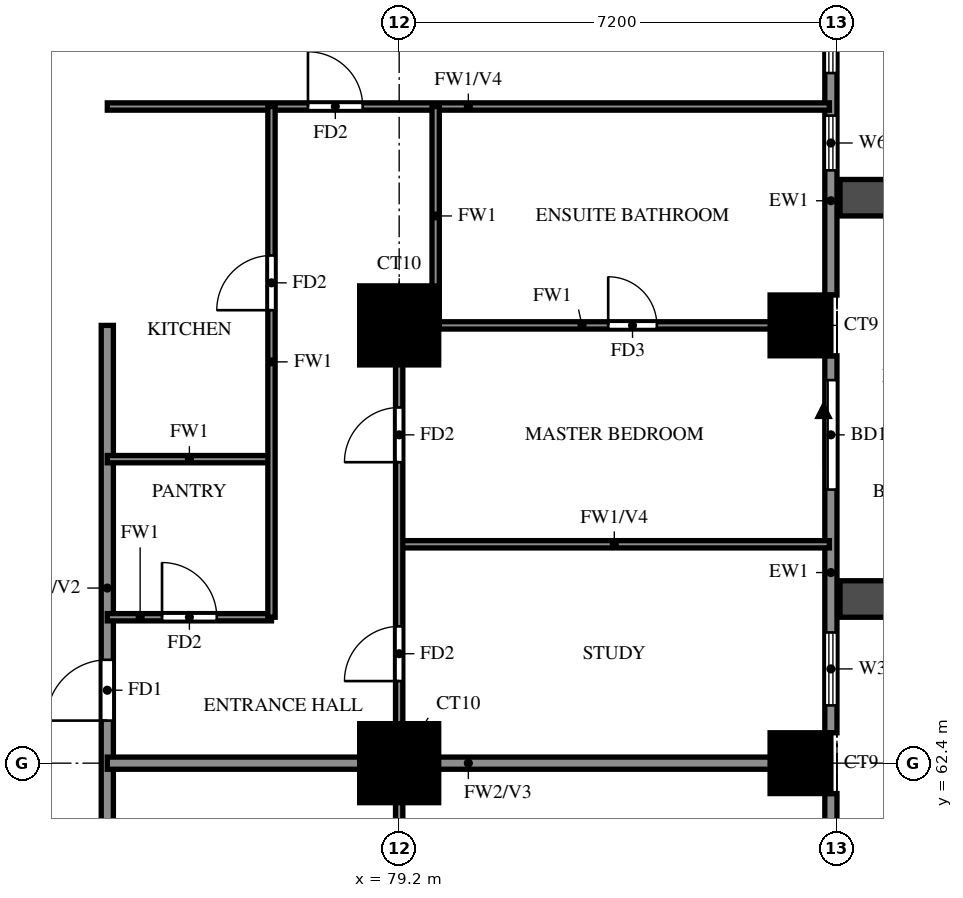
"""IFC4 building model, lengths in metres.
Left out: names, types, materials, properties, quantities, classifications, styles, units other than length and angle.
Written with IfcOpenShell. Run it as: python <this file> out.ifc"""

import sys

from ifc_helpers import new_model, si_unit, direction, frame, frame_2d, origin, origin_2d, place, context, subcontext, project, spatial, rectangle, extrude, source, transform, mapped, element, fill, save


model = new_model("IFC4")
c1 = context("Model", 3, precision=1e-05, world=origin(), true_north=direction((0.0, 1.0)))
c2 = subcontext(c1, "Body", "Model", "MODEL_VIEW")
j1 = project(units=[si_unit("LENGTHUNIT", "METRE"), si_unit("PLANEANGLEUNIT", "RADIAN")], contexts=[c1])
p1 = place(None, origin())
s1 = spatial("IfcSite", under=j1, at=p1, CompositionType="ELEMENT")
p2 = place(p1, origin())
s2 = spatial("IfcBuilding", under=s1, at=p2, CompositionType="ELEMENT")
p3 = place(p2, frame((0.0, 0.0, 65.5)))
s3 = spatial("IfcBuildingStorey", under=s2, at=p3, CompositionType="ELEMENT", Elevation=65.5)
m1 = source(origin(), c2, "Body", "SweptSolid", [
    extrude(rectangle(XDim=1.3, YDim=1.3, at=origin_2d()), origin(), (0.0, 0.0, 1.0), 3.18),
])
p4 = place(p3, frame((79.2, 62.4, 0.0), z_axis=(0.0, 0.0, 1.0), x_axis=(1.0, 0.0, 0.0)))
e1 = element("IfcColumn", 1, at=p4, inside=s3, PredefinedType="COLUMN", context=c2, shape_type="MappedRepresentation", body=[
    mapped(m1, transform((0.0, 0.0, 0.0))),
])
m2 = source(origin(), c2, "Body", "SweptSolid", [
    extrude(rectangle(XDim=1.0, YDim=1.0, at=origin_2d()), origin(), (0.0, 0.0, 1.0), 3.18),
])
p5 = place(p3, frame((85.8, 62.4, 0.0), z_axis=(0.0, 0.0, 1.0), x_axis=(1.0, 0.0, 0.0)))
e2 = element("IfcColumn", 2, at=p5, inside=s3, PredefinedType="COLUMN", context=c2, shape_type="MappedRepresentation", body=[
    mapped(m2, transform((0.0, 0.0, 0.0))),
])
p6 = place(p3, frame((79.2, 69.6, 0.0), z_axis=(0.0, 0.0, 1.0), x_axis=(1.0, 0.0, 0.0)))
e3 = element("IfcColumn", 3, at=p6, inside=s3, PredefinedType="COLUMN", context=c2, shape_type="MappedRepresentation", body=[
    mapped(m1, transform((0.0, 0.0, 0.0))),
])
p7 = place(p3, frame((85.8, 69.6, 0.0), z_axis=(0.0, 0.0, 1.0), x_axis=(1.0, 0.0, 0.0)))
e4 = element("IfcColumn", 4, at=p7, inside=s3, PredefinedType="COLUMN", context=c2, shape_type="MappedRepresentation", body=[
    mapped(m2, transform((0.0, 0.0, 0.0))),
])
p8 = place(p3, frame((86.3, 55.7, 0.0), z_axis=(0.0, 0.0, 1.0), x_axis=(0.0, 1.0, 0.0)))
e5 = element("IfcWall", 5, at=p8, inside=s3, PredefinedType="SOLIDWALL", context=c2, shape_type="SweptSolid", body=[
    extrude(rectangle(XDim=6.2, YDim=0.2, at=frame_2d((3.1, 0.0))), origin(), (0.0, 0.0, 1.0), 3.18),
])
p9 = place(p8, frame((0.3, 0.0, 0.6)))
e6 = element("IfcOpeningElement", 6, at=p9, cuts=e5, PredefinedType="OPENING", context=c2, shape_type="SweptSolid", body=[
    extrude(rectangle(XDim=0.9, YDim=2.4, at=frame_2d((0.45, 1.2))), frame((0.0, 0.11, 0.0), z_axis=(0.0, -1.0, 0.0), x_axis=(1.0, 0.0, 0.0)), (0.0, 0.0, 1.0), 0.22),
])
p10 = place(p8, frame((2.75, 0.0, 0.6)))
e7 = element("IfcOpeningElement", 7, at=p10, cuts=e5, PredefinedType="OPENING", context=c2, shape_type="SweptSolid", body=[
    extrude(rectangle(XDim=2.4, YDim=2.4, at=frame_2d((1.2, 1.2))), frame((0.0, 0.11, 0.0), z_axis=(0.0, -1.0, 0.0), x_axis=(1.0, 0.0, 0.0)), (0.0, 0.0, 1.0), 0.22),
])
p11 = place(p3, frame((86.3, 62.9, 0.0), z_axis=(0.0, 0.0, 1.0), x_axis=(0.0, 1.0, 0.0)))
e8 = element("IfcWall", 8, at=p11, inside=s3, PredefinedType="SOLIDWALL", context=c2, shape_type="SweptSolid", body=[
    extrude(rectangle(XDim=6.2, YDim=0.2, at=frame_2d((3.1, 0.0))), origin(), (0.0, 0.0, 1.0), 3.18),
])
p12 = place(p11, frame((4.0, 0.0, 0.0)))
e9 = element("IfcOpeningElement", 9, at=p12, cuts=e8, PredefinedType="OPENING", context=c2, shape_type="SweptSolid", body=[
    extrude(rectangle(XDim=1.8, YDim=2.4, at=frame_2d((0.9, 1.2))), frame((0.0, 0.11, 0.0), z_axis=(0.0, -1.0, 0.0), x_axis=(1.0, 0.0, 0.0)), (0.0, 0.0, 1.0), 0.22),
])
p13 = place(p11, frame((0.45, 0.0, 0.6)))
e10 = element("IfcOpeningElement", 10, at=p13, cuts=e8, PredefinedType="OPENING", context=c2, shape_type="SweptSolid", body=[
    extrude(rectangle(XDim=1.2, YDim=2.4, at=frame_2d((0.6, 1.2))), frame((0.0, 0.11, 0.0), z_axis=(0.0, -1.0, 0.0), x_axis=(1.0, 0.0, 0.0)), (0.0, 0.0, 1.0), 0.22),
])
p14 = place(p3, frame((86.3, 70.1, 0.0), z_axis=(0.0, 0.0, 1.0), x_axis=(0.0, 1.0, 0.0)))
e11 = element("IfcWall", 11, at=p14, inside=s3, PredefinedType="SOLIDWALL", context=c2, shape_type="SweptSolid", body=[
    extrude(rectangle(XDim=6.2, YDim=0.2, at=frame_2d((3.1, 0.0))), origin(), (0.0, 0.0, 1.0), 3.18),
])
p15 = place(p14, frame((2.05, 0.0, 1.5)))
e12 = element("IfcOpeningElement", 12, at=p15, cuts=e11, PredefinedType="OPENING", context=c2, shape_type="SweptSolid", body=[
    extrude(rectangle(XDim=0.9, YDim=0.9, at=frame_2d((0.45, 0.45))), frame((0.0, 0.11, 0.0), z_axis=(0.0, -1.0, 0.0), x_axis=(1.0, 0.0, 0.0)), (0.0, 0.0, 1.0), 0.22),
])
p16 = place(p14, frame((3.65, 0.0, 0.6)))
e13 = element("IfcOpeningElement", 13, at=p16, cuts=e11, PredefinedType="OPENING", context=c2, shape_type="SweptSolid", body=[
    extrude(rectangle(XDim=1.8, YDim=2.4, at=frame_2d((0.9, 1.2))), frame((0.0, 0.11, 0.0), z_axis=(0.0, -1.0, 0.0), x_axis=(1.0, 0.0, 0.0)), (0.0, 0.0, 1.0), 0.22),
])
for number, where, z_axis, x_axis in (
    (14, (86.45, 65.1, 0.0), (0.0, 0.0, 1.0), (1.0, 0.0, 0.0)),
    (15, (86.45, 71.7, 0.0), (0.0, 0.0, 1.0), (1.0, 0.0, 0.0)),
):
    element("IfcWall", number, at=place(p3, frame(where, z_axis=z_axis, x_axis=x_axis)), inside=s3, PredefinedType="SOLIDWALL", context=c2, shape_type="SweptSolid", body=[
        extrude(rectangle(XDim=2.65, YDim=0.6, at=frame_2d((1.325, 0.0))), origin(), (0.0, 0.0, 1.0), 2.85),
    ])
p17 = place(p3, frame((74.4, 60.0, 0.0), z_axis=(0.0, 0.0, 1.0), x_axis=(0.0, 1.0, 0.0)))
e16 = element("IfcWall", 16, at=p17, inside=s3, PredefinedType="SOLIDWALL", context=c2, shape_type="SweptSolid", body=[
    extrude(rectangle(XDim=9.6, YDim=0.2, at=frame_2d((4.8, 0.0))), origin(), (0.0, 0.0, 1.0), 3.18),
])
p18 = place(p17, frame((3.1, 0.0, 0.0)))
e17 = element("IfcOpeningElement", 17, at=p18, cuts=e16, PredefinedType="OPENING", context=c2, shape_type="SweptSolid", body=[
    extrude(rectangle(XDim=1.0, YDim=2.1, at=frame_2d((0.5, 1.05))), frame((0.0, 0.11, 0.0), z_axis=(0.0, -1.0, 0.0), x_axis=(1.0, 0.0, 0.0)), (0.0, 0.0, 1.0), 0.22),
])
p19 = place(p3, frame((74.4, 62.4, 0.0), z_axis=(0.0, 0.0, 1.0), x_axis=(1.0, 0.0, 0.0)))
e18 = element("IfcWall", 18, at=p19, inside=s3, PredefinedType="SOLIDWALL", context=c2, shape_type="SweptSolid", body=[
    extrude(rectangle(XDim=11.875, YDim=0.2, at=frame_2d((5.938, 0.0))), origin(), (0.0, 0.0, 1.0), 3.18),
])
p20 = place(p3, frame((74.4, 64.8, 0.0), z_axis=(0.0, 0.0, 1.0), x_axis=(1.0, 0.0, 0.0)))
e19 = element("IfcWall", 19, at=p20, inside=s3, PredefinedType="PARTITIONING", context=c2, shape_type="SweptSolid", body=[
    extrude(rectangle(XDim=2.7, YDim=0.12, at=frame_2d((1.35, 0.0))), origin(), (0.0, 0.0, 1.0), 3.18),
])
p21 = place(p20, frame((0.9, 0.0, 0.0)))
e20 = element("IfcOpeningElement", 20, at=p21, cuts=e19, PredefinedType="OPENING", context=c2, shape_type="SweptSolid", body=[
    extrude(rectangle(XDim=0.9, YDim=2.1, at=frame_2d((0.45, 1.05))), frame((0.0, 0.07, 0.0), z_axis=(0.0, -1.0, 0.0), x_axis=(1.0, 0.0, 0.0)), (0.0, 0.0, 1.0), 0.14),
])
p22 = place(p3, frame((79.2, 66.0, 0.0), z_axis=(0.0, 0.0, 1.0), x_axis=(1.0, 0.0, 0.0)))
e21 = element("IfcWall", 21, at=p22, inside=s3, PredefinedType="PARTITIONING", context=c2, shape_type="SweptSolid", body=[
    extrude(rectangle(XDim=7.075, YDim=0.12, at=frame_2d((3.538, 0.0))), origin(), (0.0, 0.0, 1.0), 2.28),
])
p23 = place(p3, frame((74.4, 67.4, 0.0), z_axis=(0.0, 0.0, 1.0), x_axis=(1.0, 0.0, 0.0)))
e22 = element("IfcWall", 22, at=p23, inside=s3, PredefinedType="PARTITIONING", context=c2, shape_type="SweptSolid", body=[
    extrude(rectangle(XDim=2.7, YDim=0.12, at=frame_2d((1.35, 0.0))), origin(), (0.0, 0.0, 1.0), 3.18),
])
p24 = place(p3, frame((79.2, 69.6, 0.0), z_axis=(0.0, 0.0, 1.0), x_axis=(1.0, 0.0, 0.0)))
e23 = element("IfcWall", 23, at=p24, inside=s3, PredefinedType="PARTITIONING", context=c2, shape_type="SweptSolid", body=[
    extrude(rectangle(XDim=7.075, YDim=0.12, at=frame_2d((3.538, 0.0))), origin(), (0.0, 0.0, 1.0), 3.18),
])
p25 = place(p24, frame((3.438, 0.0, 0.0)))
e24 = element("IfcOpeningElement", 24, at=p25, cuts=e23, PredefinedType="OPENING", context=c2, shape_type="SweptSolid", body=[
    extrude(rectangle(XDim=0.8, YDim=2.1, at=frame_2d((0.4, 1.05))), frame((0.0, 0.07, 0.0), z_axis=(0.0, -1.0, 0.0), x_axis=(1.0, 0.0, 0.0)), (0.0, 0.0, 1.0), 0.14),
])
p26 = place(p3, frame((74.4, 73.2, 0.0), z_axis=(0.0, 0.0, 1.0), x_axis=(1.0, 0.0, 0.0)))
e25 = element("IfcWall", 25, at=p26, inside=s3, PredefinedType="PARTITIONING", context=c2, shape_type="SweptSolid", body=[
    extrude(rectangle(XDim=11.875, YDim=0.12, at=frame_2d((5.938, 0.0))), origin(), (0.0, 0.0, 1.0), 2.28),
])
p27 = place(p26, frame((3.3, 0.0, 0.0)))
e26 = element("IfcOpeningElement", 26, at=p27, cuts=e25, PredefinedType="OPENING", context=c2, shape_type="SweptSolid", body=[
    extrude(rectangle(XDim=0.9, YDim=2.1, at=frame_2d((0.45, 1.05))), frame((0.0, 0.07, 0.0), z_axis=(0.0, -1.0, 0.0), x_axis=(1.0, 0.0, 0.0)), (0.0, 0.0, 1.0), 0.14),
])
p28 = place(p3, frame((77.1, 64.8, 0.0), z_axis=(0.0, 0.0, 1.0), x_axis=(0.0, 1.0, 0.0)))
e27 = element("IfcWall", 27, at=p28, inside=s3, PredefinedType="PARTITIONING", context=c2, shape_type="SweptSolid", body=[
    extrude(rectangle(XDim=8.4, YDim=0.12, at=frame_2d((4.2, 0.0))), origin(), (0.0, 0.0, 1.0), 3.18),
])
p29 = place(p28, frame((5.05, 0.0, 0.0)))
e28 = element("IfcOpeningElement", 28, at=p29, cuts=e27, PredefinedType="OPENING", context=c2, shape_type="SweptSolid", body=[
    extrude(rectangle(XDim=0.9, YDim=2.1, at=frame_2d((0.45, 1.05))), frame((0.0, 0.07, 0.0), z_axis=(0.0, -1.0, 0.0), x_axis=(1.0, 0.0, 0.0)), (0.0, 0.0, 1.0), 0.14),
])
p30 = place(p3, frame((79.2, 48.125, 0.0), z_axis=(0.0, 0.0, 1.0), x_axis=(0.0, 1.0, 0.0)))
e29 = element("IfcWall", 29, at=p30, inside=s3, PredefinedType="PARTITIONING", context=c2, shape_type="SweptSolid", body=[
    extrude(rectangle(XDim=21.475, YDim=0.12, at=frame_2d((10.738, 0.0))), origin(), (0.0, 0.0, 1.0), 3.18),
])
p31 = place(p30, frame((1.288, 0.0, 0.0)))
e30 = element("IfcOpeningElement", 30, at=p31, cuts=e29, PredefinedType="OPENING", context=c2, shape_type="SweptSolid", body=[
    extrude(rectangle(XDim=0.9, YDim=2.1, at=frame_2d((0.45, 1.05))), frame((0.0, 0.07, 0.0), z_axis=(0.0, -1.0, 0.0), x_axis=(1.0, 0.0, 0.0)), (0.0, 0.0, 1.0), 0.14),
])
p32 = place(p30, frame((4.825, 0.0, 0.0)))
e31 = element("IfcOpeningElement", 31, at=p32, cuts=e29, PredefinedType="OPENING", context=c2, shape_type="SweptSolid", body=[
    extrude(rectangle(XDim=0.9, YDim=2.1, at=frame_2d((0.45, 1.05))), frame((0.0, 0.07, 0.0), z_axis=(0.0, -1.0, 0.0), x_axis=(1.0, 0.0, 0.0)), (0.0, 0.0, 1.0), 0.14),
])
p33 = place(p30, frame((9.925, 0.0, 0.0)))
e32 = element("IfcOpeningElement", 32, at=p33, cuts=e29, PredefinedType="OPENING", context=c2, shape_type="SweptSolid", body=[
    extrude(rectangle(XDim=1.5, YDim=2.1, at=frame_2d((0.75, 1.05))), frame((0.0, 0.07, 0.0), z_axis=(0.0, -1.0, 0.0), x_axis=(1.0, 0.0, 0.0)), (0.0, 0.0, 1.0), 0.14),
])
p34 = place(p30, frame((15.625, 0.0, 0.0)))
e33 = element("IfcOpeningElement", 33, at=p34, cuts=e29, PredefinedType="OPENING", context=c2, shape_type="SweptSolid", body=[
    extrude(rectangle(XDim=0.9, YDim=2.1, at=frame_2d((0.45, 1.05))), frame((0.0, 0.07, 0.0), z_axis=(0.0, -1.0, 0.0), x_axis=(1.0, 0.0, 0.0)), (0.0, 0.0, 1.0), 0.14),
])
p35 = place(p30, frame((19.225, 0.0, 0.0)))
e34 = element("IfcOpeningElement", 34, at=p35, cuts=e29, PredefinedType="OPENING", context=c2, shape_type="SweptSolid", body=[
    extrude(rectangle(XDim=0.9, YDim=2.1, at=frame_2d((0.45, 1.05))), frame((0.0, 0.07, 0.0), z_axis=(0.0, -1.0, 0.0), x_axis=(1.0, 0.0, 0.0)), (0.0, 0.0, 1.0), 0.14),
])
p36 = place(p3, frame((79.8, 69.6, 0.0), z_axis=(0.0, 0.0, 1.0), x_axis=(0.0, 1.0, 0.0)))
e35 = element("IfcWall", 35, at=p36, inside=s3, PredefinedType="PARTITIONING", context=c2, shape_type="SweptSolid", body=[
    extrude(rectangle(XDim=3.6, YDim=0.12, at=frame_2d((1.8, 0.0))), origin(), (0.0, 0.0, 1.0), 3.18),
])
p37 = place(p12, origin())
e36 = element("IfcDoor", 36, at=p37, inside=s3, OperationType="DOUBLE_DOOR_SLIDING", PredefinedType="DOOR", context=c2, shape_type="SweptSolid", body=[
    extrude(rectangle(XDim=1.8, YDim=2.4, at=frame_2d((0.9, 1.2))), frame((0.0, 0.025, 0.0), z_axis=(0.0, -1.0, 0.0), x_axis=(1.0, 0.0, 0.0)), (0.0, 0.0, 1.0), 0.05),
])
fill(e9, e36)
p38 = place(p13, origin())
e37 = element("IfcWindow", 37, at=p38, inside=s3, PartitioningType="SINGLE_PANEL", PredefinedType="WINDOW", context=c2, shape_type="SweptSolid", body=[
    extrude(rectangle(XDim=1.2, YDim=2.4, at=frame_2d((0.6, 1.2))), frame((0.0, 0.03, 0.0), z_axis=(0.0, -1.0, 0.0), x_axis=(1.0, 0.0, 0.0)), (0.0, 0.0, 1.0), 0.06),
])
fill(e10, e37)
p39 = place(p15, origin())
e38 = element("IfcWindow", 38, at=p39, inside=s3, PartitioningType="SINGLE_PANEL", PredefinedType="WINDOW", context=c2, shape_type="SweptSolid", body=[
    extrude(rectangle(XDim=0.9, YDim=0.9, at=frame_2d((0.45, 0.45))), frame((0.0, 0.03, 0.0), z_axis=(0.0, -1.0, 0.0), x_axis=(1.0, 0.0, 0.0)), (0.0, 0.0, 1.0), 0.06),
])
fill(e12, e38)
p40 = place(p16, origin())
e39 = element("IfcWindow", 39, at=p40, inside=s3, PartitioningType="DOUBLE_PANEL_VERTICAL", PredefinedType="WINDOW", context=c2, shape_type="SweptSolid", body=[
    extrude(rectangle(XDim=1.8, YDim=2.4, at=frame_2d((0.9, 1.2))), frame((0.0, 0.03, 0.0), z_axis=(0.0, -1.0, 0.0), x_axis=(1.0, 0.0, 0.0)), (0.0, 0.0, 1.0), 0.06),
])
fill(e13, e39)
p41 = place(p18, origin())
e40 = element("IfcDoor", 40, at=p41, inside=s3, OperationType="SINGLE_SWING_LEFT", PredefinedType="DOOR", context=c2, shape_type="SweptSolid", body=[
    extrude(rectangle(XDim=1.0, YDim=2.1, at=frame_2d((0.5, 1.05))), frame((0.0, 0.025, 0.0), z_axis=(0.0, -1.0, 0.0), x_axis=(1.0, 0.0, 0.0)), (0.0, 0.0, 1.0), 0.05),
])
fill(e17, e40)
p42 = place(p34, origin())
e41 = element("IfcDoor", 41, at=p42, inside=s3, OperationType="SINGLE_SWING_LEFT", PredefinedType="DOOR", context=c2, shape_type="SweptSolid", body=[
    extrude(rectangle(XDim=0.9, YDim=2.1, at=frame_2d((0.45, 1.05))), frame((0.0, 0.025, 0.0), z_axis=(0.0, -1.0, 0.0), x_axis=(1.0, 0.0, 0.0)), (0.0, 0.0, 1.0), 0.05),
])
fill(e33, e41)
p43 = place(p35, origin())
e42 = element("IfcDoor", 42, at=p43, inside=s3, OperationType="SINGLE_SWING_RIGHT", PredefinedType="DOOR", context=c2, shape_type="SweptSolid", body=[
    extrude(rectangle(XDim=0.9, YDim=2.1, at=frame_2d((0.45, 1.05))), frame((0.0, 0.025, 0.0), z_axis=(0.0, -1.0, 0.0), x_axis=(1.0, 0.0, 0.0)), (0.0, 0.0, 1.0), 0.05),
])
fill(e34, e42)
p44 = place(p25, origin())
e43 = element("IfcDoor", 43, at=p44, inside=s3, OperationType="SINGLE_SWING_LEFT", PredefinedType="DOOR", context=c2, shape_type="SweptSolid", body=[
    extrude(rectangle(XDim=0.8, YDim=2.1, at=frame_2d((0.4, 1.05))), frame((0.0, 0.025, 0.0), z_axis=(0.0, -1.0, 0.0), x_axis=(1.0, 0.0, 0.0)), (0.0, 0.0, 1.0), 0.05),
])
fill(e24, e43)
p45 = place(p27, origin())
e44 = element("IfcDoor", 44, at=p45, inside=s3, OperationType="SINGLE_SWING_LEFT", PredefinedType="DOOR", context=c2, shape_type="SweptSolid", body=[
    extrude(rectangle(XDim=0.9, YDim=2.1, at=frame_2d((0.45, 1.05))), frame((0.0, 0.025, 0.0), z_axis=(0.0, -1.0, 0.0), x_axis=(1.0, 0.0, 0.0)), (0.0, 0.0, 1.0), 0.05),
])
fill(e26, e44)
p46 = place(p21, origin())
e45 = element("IfcDoor", 45, at=p46, inside=s3, OperationType="SINGLE_SWING_RIGHT", PredefinedType="DOOR", context=c2, shape_type="SweptSolid", body=[
    extrude(rectangle(XDim=0.9, YDim=2.1, at=frame_2d((0.45, 1.05))), frame((0.0, 0.025, 0.0), z_axis=(0.0, -1.0, 0.0), x_axis=(1.0, 0.0, 0.0)), (0.0, 0.0, 1.0), 0.05),
])
fill(e20, e45)
p47 = place(p29, origin())
e46 = element("IfcDoor", 46, at=p47, inside=s3, OperationType="SINGLE_SWING_LEFT", PredefinedType="DOOR", context=c2, shape_type="SweptSolid", body=[
    extrude(rectangle(XDim=0.9, YDim=2.1, at=frame_2d((0.45, 1.05))), frame((0.0, 0.025, 0.0), z_axis=(0.0, -1.0, 0.0), x_axis=(1.0, 0.0, 0.0)), (0.0, 0.0, 1.0), 0.05),
])
fill(e28, e46)
save(model, sys.argv[1])
